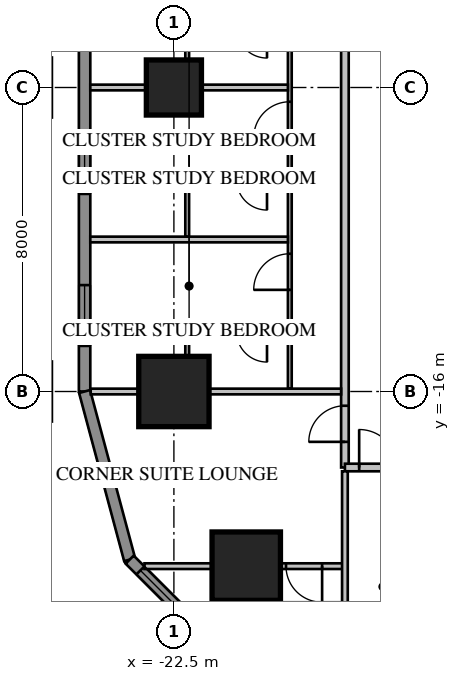
"""IFC4 building model, lengths in metres.
Left out: names, types, materials, properties, quantities, classifications, styles, units other than length and angle.
Written with IfcOpenShell. Run it as: python <this file> out.ifc"""

import sys

from ifc_helpers import new_model, si_unit, direction, frame, frame_2d, origin, origin_2d, place, context, subcontext, project, spatial, rectangle, extrude, element, fill, save


model = new_model("IFC4")
c1 = context("Model", 3, precision=1e-05, world=origin(), true_north=direction((0.0, 1.0)))
c2 = subcontext(c1, "Body", "Model", "MODEL_VIEW")
j1 = project(units=[si_unit("LENGTHUNIT", "METRE"), si_unit("PLANEANGLEUNIT", "RADIAN")], contexts=[c1])
p1 = place(None, origin())
s1 = spatial("IfcSite", under=j1, at=p1, CompositionType="ELEMENT")
p2 = place(p1, origin())
s2 = spatial("IfcBuilding", under=s1, at=p2, CompositionType="ELEMENT")
p3 = place(p2, frame((0.0, 0.0, 27.55)))
s3 = spatial("IfcBuildingStorey", under=s2, at=p3, CompositionType="ELEMENT", Elevation=27.55)
p4 = place(p3, frame((-22.5, -8.0, 0.0), z_axis=(0.0, 0.0, 1.0), x_axis=(1.0, 0.0, 0.0)))
e1 = element("IfcColumn", 1, at=p4, inside=s3, PredefinedType="COLUMN", context=c2, shape_type="SweptSolid", body=[
    extrude(rectangle(XDim=1.45, YDim=1.45, at=origin_2d()), origin(), (0.0, 0.0, 1.0), 3.85),
])
p5 = place(p3, frame((-22.5, -16.0, 0.0), z_axis=(0.0, 0.0, 1.0), x_axis=(1.0, 0.0, 0.0)))
e2 = element("IfcColumn", 2, at=p5, inside=s3, PredefinedType="COLUMN", context=c2, shape_type="SweptSolid", body=[
    extrude(rectangle(XDim=1.85, YDim=1.85, at=origin_2d()), origin(), (0.0, 0.0, 1.0), 3.85),
])
p6 = place(p3, frame((-20.596, -20.596, 0.0), z_axis=(0.0, 0.0, 1.0), x_axis=(1.0, 0.0, 0.0)))
e3 = element("IfcColumn", 3, at=p6, inside=s3, PredefinedType="COLUMN", context=c2, shape_type="SweptSolid", body=[
    extrude(rectangle(XDim=1.8, YDim=1.8, at=origin_2d()), origin(), (0.0, 0.0, 1.0), 3.85),
])
p7 = place(p3, frame((-24.85, 16.0, 0.0), z_axis=(0.0, 0.0, 1.0), x_axis=(0.0, -1.0, 0.0)))
e4 = element("IfcWall", 4, at=p7, inside=s3, PredefinedType="SOLIDWALL", context=c2, shape_type="SweptSolid", body=[
    extrude(rectangle(XDim=32.0, YDim=0.3, at=frame_2d((16.0, 0.0))), origin(), (0.0, 0.0, 1.0), 3.65),
])
p8 = place(p7, frame((1.2, 0.0, 0.75)))
e5 = element("IfcOpeningElement", 5, at=p8, cuts=e4, PredefinedType="OPENING", context=c2, shape_type="SweptSolid", body=[
    extrude(rectangle(XDim=1.6, YDim=1.8, at=frame_2d((0.8, 0.9))), frame((0.0, 0.17, 0.0), z_axis=(0.0, -1.0, 0.0), x_axis=(1.0, 0.0, 0.0)), (0.0, 0.0, 1.0), 0.34),
])
p9 = place(p7, frame((5.2, 0.0, 0.75)))
e6 = element("IfcOpeningElement", 6, at=p9, cuts=e4, PredefinedType="OPENING", context=c2, shape_type="SweptSolid", body=[
    extrude(rectangle(XDim=1.6, YDim=1.8, at=frame_2d((0.8, 0.9))), frame((0.0, 0.17, 0.0), z_axis=(0.0, -1.0, 0.0), x_axis=(1.0, 0.0, 0.0)), (0.0, 0.0, 1.0), 0.34),
])
p10 = place(p7, frame((17.2, 0.0, 0.75)))
e7 = element("IfcOpeningElement", 7, at=p10, cuts=e4, PredefinedType="OPENING", context=c2, shape_type="SweptSolid", body=[
    extrude(rectangle(XDim=1.6, YDim=1.8, at=frame_2d((0.8, 0.9))), frame((0.0, 0.17, 0.0), z_axis=(0.0, -1.0, 0.0), x_axis=(1.0, 0.0, 0.0)), (0.0, 0.0, 1.0), 0.34),
])
p11 = place(p7, frame((21.2, 0.0, 0.75)))
e8 = element("IfcOpeningElement", 8, at=p11, cuts=e4, PredefinedType="OPENING", context=c2, shape_type="SweptSolid", body=[
    extrude(rectangle(XDim=1.6, YDim=1.8, at=frame_2d((0.8, 0.9))), frame((0.0, 0.17, 0.0), z_axis=(0.0, -1.0, 0.0), x_axis=(1.0, 0.0, 0.0)), (0.0, 0.0, 1.0), 0.34),
])
p12 = place(p7, frame((25.2, 0.0, 0.75)))
e9 = element("IfcOpeningElement", 9, at=p12, cuts=e4, PredefinedType="OPENING", context=c2, shape_type="SweptSolid", body=[
    extrude(rectangle(XDim=1.6, YDim=1.8, at=frame_2d((0.8, 0.9))), frame((0.0, 0.17, 0.0), z_axis=(0.0, -1.0, 0.0), x_axis=(1.0, 0.0, 0.0)), (0.0, 0.0, 1.0), 0.34),
])
p13 = place(p7, frame((29.2, 0.0, 0.75)))
e10 = element("IfcOpeningElement", 10, at=p13, cuts=e4, PredefinedType="OPENING", context=c2, shape_type="SweptSolid", body=[
    extrude(rectangle(XDim=1.6, YDim=1.8, at=frame_2d((0.8, 0.9))), frame((0.0, 0.17, 0.0), z_axis=(0.0, -1.0, 0.0), x_axis=(1.0, 0.0, 0.0)), (0.0, 0.0, 1.0), 0.34),
])
p14 = place(p7, frame((8.8, 0.0, 0.75)))
e11 = element("IfcOpeningElement", 11, at=p14, cuts=e4, PredefinedType="OPENING", context=c2, shape_type="SweptSolid", body=[
    extrude(rectangle(XDim=2.4, YDim=1.8, at=frame_2d((1.2, 0.9))), frame((0.0, 0.17, 0.0), z_axis=(0.0, -1.0, 0.0), x_axis=(1.0, 0.0, 0.0)), (0.0, 0.0, 1.0), 0.34),
])
p15 = place(p7, frame((13.812, 0.0, 0.0)))
e12 = element("IfcOpeningElement", 12, at=p15, cuts=e4, PredefinedType="OPENING", context=c2, shape_type="SweptSolid", body=[
    extrude(rectangle(XDim=1.0, YDim=2.4, at=frame_2d((0.5, 1.2))), frame((0.0, 0.17, 0.0), z_axis=(0.0, -1.0, 0.0), x_axis=(1.0, 0.0, 0.0)), (0.0, 0.0, 1.0), 0.34),
])
p16 = place(p3, frame((-24.85, -16.0, 0.0), z_axis=(0.0, 0.0, 1.0), x_axis=(0.258839972501, -0.965920218567, 0.0)))
e13 = element("IfcWall", 13, at=p16, inside=s3, PredefinedType="SOLIDWALL", context=c2, shape_type="SweptSolid", body=[
    extrude(rectangle(XDim=4.581, YDim=0.3, at=frame_2d((2.291, 0.0))), origin(), (0.0, 0.0, 1.0), 3.65),
])
p17 = place(p3, frame((-23.664, -20.425, 0.0), z_axis=(0.0, 0.0, 1.0), x_axis=(0.707106781187, -0.707106781187, 0.0)))
e14 = element("IfcWall", 14, at=p17, inside=s3, PredefinedType="SOLIDWALL", context=c2, shape_type="SweptSolid", body=[
    extrude(rectangle(XDim=4.581, YDim=0.3, at=frame_2d((2.291, 0.0))), origin(), (0.0, 0.0, 1.0), 3.65),
])
p18 = place(p17, frame((0.4, 0.0, 0.75)))
e15 = element("IfcOpeningElement", 15, at=p18, cuts=e14, PredefinedType="OPENING", context=c2, shape_type="SweptSolid", body=[
    extrude(rectangle(XDim=3.781, YDim=1.8, at=frame_2d((1.891, 0.9))), frame((0.0, 0.17, 0.0), z_axis=(0.0, -1.0, 0.0), x_axis=(1.0, 0.0, 0.0)), (0.0, 0.0, 1.0), 0.34),
])
p19 = place(p3, frame((-18.0, 18.0, 0.0), z_axis=(0.0, 0.0, 1.0), x_axis=(0.0, -1.0, 0.0)))
e16 = element("IfcWall", 16, at=p19, inside=s3, PredefinedType="PARTITIONING", context=c2, shape_type="SweptSolid", body=[
    extrude(rectangle(XDim=36.0, YDim=0.2, at=frame_2d((18.0, 0.0))), origin(), (0.0, 0.0, 1.0), 3.65),
])
p20 = place(p19, frame((10.4, 0.0, 0.0)))
e17 = element("IfcOpeningElement", 17, at=p20, cuts=e16, PredefinedType="OPENING", context=c2, shape_type="SweptSolid", body=[
    extrude(rectangle(XDim=1.0, YDim=2.1, at=frame_2d((0.5, 1.05))), frame((0.0, 0.12, 0.0), z_axis=(0.0, -1.0, 0.0), x_axis=(1.0, 0.0, 0.0)), (0.0, 0.0, 1.0), 0.24),
])
p21 = place(p19, frame((14.4, 0.0, 0.0)))
e18 = element("IfcOpeningElement", 18, at=p21, cuts=e16, PredefinedType="OPENING", context=c2, shape_type="SweptSolid", body=[
    extrude(rectangle(XDim=1.0, YDim=2.1, at=frame_2d((0.5, 1.05))), frame((0.0, 0.12, 0.0), z_axis=(0.0, -1.0, 0.0), x_axis=(1.0, 0.0, 0.0)), (0.0, 0.0, 1.0), 0.24),
])
p22 = place(p19, frame((0.375, 0.0, 0.0)))
e19 = element("IfcOpeningElement", 19, at=p22, cuts=e16, PredefinedType="OPENING", context=c2, shape_type="SweptSolid", body=[
    extrude(rectangle(XDim=1.0, YDim=2.1, at=frame_2d((0.5, 1.05))), frame((0.0, 0.12, 0.0), z_axis=(0.0, -1.0, 0.0), x_axis=(1.0, 0.0, 0.0)), (0.0, 0.0, 1.0), 0.24),
])
p23 = place(p19, frame((34.375, 0.0, 0.0)))
e20 = element("IfcOpeningElement", 20, at=p23, cuts=e16, PredefinedType="OPENING", context=c2, shape_type="SweptSolid", body=[
    extrude(rectangle(XDim=0.95, YDim=2.1, at=frame_2d((0.475, 1.05))), frame((0.0, 0.12, 0.0), z_axis=(0.0, -1.0, 0.0), x_axis=(1.0, 0.0, 0.0)), (0.0, 0.0, 1.0), 0.24),
])
p24 = place(p3, frame((-19.45, 3.925, 0.0), z_axis=(0.0, 0.0, 1.0), x_axis=(0.0, -1.0, 0.0)))
e21 = element("IfcWall", 21, at=p24, inside=s3, PredefinedType="PARTITIONING", context=c2, shape_type="SweptSolid", body=[
    extrude(rectangle(XDim=19.85, YDim=0.1, at=frame_2d((9.925, 0.0))), origin(), (0.0, 0.0, 1.0), 3.65),
])
p25 = place(p24, frame((2.125, 0.0, 0.0)))
e22 = element("IfcOpeningElement", 22, at=p25, cuts=e21, PredefinedType="OPENING", context=c2, shape_type="SweptSolid", body=[
    extrude(rectangle(XDim=1.0, YDim=2.1, at=frame_2d((0.5, 1.05))), frame((0.0, 0.07, 0.0), z_axis=(0.0, -1.0, 0.0), x_axis=(1.0, 0.0, 0.0)), (0.0, 0.0, 1.0), 0.14),
])
p26 = place(p24, frame((0.3, 0.0, 0.0)))
e23 = element("IfcOpeningElement", 23, at=p26, cuts=e21, PredefinedType="OPENING", context=c2, shape_type="SweptSolid", body=[
    extrude(rectangle(XDim=0.8, YDim=2.1, at=frame_2d((0.4, 1.05))), frame((0.0, 0.07, 0.0), z_axis=(0.0, -1.0, 0.0), x_axis=(1.0, 0.0, 0.0)), (0.0, 0.0, 1.0), 0.14),
])
p27 = place(p24, frame((4.3, 0.0, 0.0)))
e24 = element("IfcOpeningElement", 24, at=p27, cuts=e21, PredefinedType="OPENING", context=c2, shape_type="SweptSolid", body=[
    extrude(rectangle(XDim=0.95, YDim=2.1, at=frame_2d((0.475, 1.05))), frame((0.0, 0.07, 0.0), z_axis=(0.0, -1.0, 0.0), x_axis=(1.0, 0.0, 0.0)), (0.0, 0.0, 1.0), 0.14),
])
p28 = place(p24, frame((8.3, 0.0, 0.0)))
e25 = element("IfcOpeningElement", 25, at=p28, cuts=e21, PredefinedType="OPENING", context=c2, shape_type="SweptSolid", body=[
    extrude(rectangle(XDim=0.95, YDim=2.1, at=frame_2d((0.475, 1.05))), frame((0.0, 0.07, 0.0), z_axis=(0.0, -1.0, 0.0), x_axis=(1.0, 0.0, 0.0)), (0.0, 0.0, 1.0), 0.14),
])
p29 = place(p24, frame((12.3, 0.0, 0.0)))
e26 = element("IfcOpeningElement", 26, at=p29, cuts=e21, PredefinedType="OPENING", context=c2, shape_type="SweptSolid", body=[
    extrude(rectangle(XDim=0.95, YDim=2.1, at=frame_2d((0.475, 1.05))), frame((0.0, 0.07, 0.0), z_axis=(0.0, -1.0, 0.0), x_axis=(1.0, 0.0, 0.0)), (0.0, 0.0, 1.0), 0.14),
])
p30 = place(p24, frame((16.3, 0.0, 0.0)))
e27 = element("IfcOpeningElement", 27, at=p30, cuts=e21, PredefinedType="OPENING", context=c2, shape_type="SweptSolid", body=[
    extrude(rectangle(XDim=0.95, YDim=2.1, at=frame_2d((0.475, 1.05))), frame((0.0, 0.07, 0.0), z_axis=(0.0, -1.0, 0.0), x_axis=(1.0, 0.0, 0.0)), (0.0, 0.0, 1.0), 0.14),
])
for number, where, z_axis, x_axis in (
    (28, (-19.5, -8.0, 0.0), (0.0, 0.0, 1.0), (-1.0, 0.0, 0.0)),
    (29, (-19.5, -12.0, 0.0), (0.0, 0.0, 1.0), (-1.0, 0.0, 0.0)),
):
    element("IfcWall", number, at=place(p3, frame(where, z_axis=z_axis, x_axis=x_axis)), inside=s3, PredefinedType="PARTITIONING", context=c2, shape_type="SweptSolid", body=[
        extrude(rectangle(XDim=5.2, YDim=0.15, at=frame_2d((2.6, 0.0))), origin(), (0.0, 0.0, 1.0), 3.65),
    ])
p31 = place(p3, frame((-18.1, -16.0, 0.0), z_axis=(0.0, 0.0, 1.0), x_axis=(-1.0, 0.0, 0.0)))
e30 = element("IfcWall", 30, at=p31, inside=s3, PredefinedType="PARTITIONING", context=c2, shape_type="SweptSolid", body=[
    extrude(rectangle(XDim=6.589, YDim=0.15, at=frame_2d((3.295, 0.0))), origin(), (0.0, 0.0, 1.0), 3.65),
])
p32 = place(p3, frame((-22.15, -6.475, 0.0), z_axis=(0.0, 0.0, 1.0), x_axis=(0.0, -1.0, 0.0)))
e31 = element("IfcWall", 31, at=p32, inside=s3, PredefinedType="PARTITIONING", context=c2, shape_type="SweptSolid", body=[
    extrude(rectangle(XDim=1.45, YDim=0.1, at=frame_2d((0.725, 0.0))), origin(), (0.0, 0.0, 1.0), 3.65),
])
p33 = place(p3, frame((-19.5, -10.425, 0.0), z_axis=(0.0, 0.0, 1.0), x_axis=(-1.0, 0.0, 0.0)))
e32 = element("IfcWall", 32, at=p33, inside=s3, PredefinedType="PARTITIONING", context=c2, shape_type="SweptSolid", body=[
    extrude(rectangle(XDim=2.7, YDim=0.1, at=frame_2d((1.35, 0.0))), origin(), (0.0, 0.0, 1.0), 3.65),
])
p34 = place(p33, frame((0.55, 0.0, 0.0)))
e33 = element("IfcOpeningElement", 33, at=p34, cuts=e32, PredefinedType="OPENING", context=c2, shape_type="SweptSolid", body=[
    extrude(rectangle(XDim=0.8, YDim=2.1, at=frame_2d((0.4, 1.05))), frame((0.0, 0.07, 0.0), z_axis=(0.0, -1.0, 0.0), x_axis=(1.0, 0.0, 0.0)), (0.0, 0.0, 1.0), 0.14),
])
p35 = place(p3, frame((-22.15, -10.475, 0.0), z_axis=(0.0, 0.0, 1.0), x_axis=(0.0, -1.0, 0.0)))
e34 = element("IfcWall", 34, at=p35, inside=s3, PredefinedType="PARTITIONING", context=c2, shape_type="SweptSolid", body=[
    extrude(rectangle(XDim=1.45, YDim=0.1, at=frame_2d((0.725, 0.0))), origin(), (0.0, 0.0, 1.0), 3.65),
])
p36 = place(p3, frame((-19.5, -14.425, 0.0), z_axis=(0.0, 0.0, 1.0), x_axis=(-1.0, 0.0, 0.0)))
e35 = element("IfcWall", 35, at=p36, inside=s3, PredefinedType="PARTITIONING", context=c2, shape_type="SweptSolid", body=[
    extrude(rectangle(XDim=2.7, YDim=0.1, at=frame_2d((1.35, 0.0))), origin(), (0.0, 0.0, 1.0), 3.65),
])
p37 = place(p36, frame((0.55, 0.0, 0.0)))
e36 = element("IfcOpeningElement", 36, at=p37, cuts=e35, PredefinedType="OPENING", context=c2, shape_type="SweptSolid", body=[
    extrude(rectangle(XDim=0.8, YDim=2.1, at=frame_2d((0.4, 1.05))), frame((0.0, 0.07, 0.0), z_axis=(0.0, -1.0, 0.0), x_axis=(1.0, 0.0, 0.0)), (0.0, 0.0, 1.0), 0.14),
])
p38 = place(p3, frame((-22.15, -14.475, 0.0), z_axis=(0.0, 0.0, 1.0), x_axis=(0.0, -1.0, 0.0)))
e37 = element("IfcWall", 37, at=p38, inside=s3, PredefinedType="PARTITIONING", context=c2, shape_type="SweptSolid", body=[
    extrude(rectangle(XDim=1.45, YDim=0.1, at=frame_2d((0.725, 0.0))), origin(), (0.0, 0.0, 1.0), 3.65),
])
p39 = place(p3, frame((-18.065, -20.596, 0.0), z_axis=(0.0, 0.0, 1.0), x_axis=(-1.0, 0.0, 0.0)))
e38 = element("IfcWall", 38, at=p39, inside=s3, PredefinedType="PARTITIONING", context=c2, shape_type="SweptSolid", body=[
    extrude(rectangle(XDim=5.209, YDim=0.15, at=frame_2d((2.604, 0.0))), origin(), (0.0, 0.0, 1.0), 3.65),
])
p40 = place(p39, frame((0.535, 0.0, 0.0)))
e39 = element("IfcOpeningElement", 39, at=p40, cuts=e38, PredefinedType="OPENING", context=c2, shape_type="SweptSolid", body=[
    extrude(rectangle(XDim=0.95, YDim=2.1, at=frame_2d((0.475, 1.05))), frame((0.0, 0.095, 0.0), z_axis=(0.0, -1.0, 0.0), x_axis=(1.0, 0.0, 0.0)), (0.0, 0.0, 1.0), 0.19),
])
p41 = place(p3, frame((-18.0, -18.0, 0.0), z_axis=(0.0, 0.0, 1.0), x_axis=(1.0, 0.0, 0.0)))
e40 = element("IfcWall", 40, at=p41, inside=s3, PredefinedType="PARTITIONING", context=c2, shape_type="SweptSolid", body=[
    extrude(rectangle(XDim=36.0, YDim=0.2, at=frame_2d((18.0, 0.0))), origin(), (0.0, 0.0, 1.0), 3.65),
])
p42 = place(p41, frame((0.375, 0.0, 0.0)))
e41 = element("IfcOpeningElement", 41, at=p42, cuts=e40, PredefinedType="OPENING", context=c2, shape_type="SweptSolid", body=[
    extrude(rectangle(XDim=1.0, YDim=2.1, at=frame_2d((0.5, 1.05))), frame((0.0, 0.12, 0.0), z_axis=(0.0, -1.0, 0.0), x_axis=(1.0, 0.0, 0.0)), (0.0, 0.0, 1.0), 0.24),
])
p43 = place(p41, frame((2.45, 0.0, 0.0)))
e42 = element("IfcOpeningElement", 42, at=p43, cuts=e40, PredefinedType="OPENING", context=c2, shape_type="SweptSolid", body=[
    extrude(rectangle(XDim=0.8, YDim=2.1, at=frame_2d((0.4, 1.05))), frame((0.0, 0.12, 0.0), z_axis=(0.0, -1.0, 0.0), x_axis=(1.0, 0.0, 0.0)), (0.0, 0.0, 1.0), 0.24),
])
p44 = place(p41, frame((4.05, 0.0, 0.0)))
e43 = element("IfcOpeningElement", 43, at=p44, cuts=e40, PredefinedType="OPENING", context=c2, shape_type="SweptSolid", body=[
    extrude(rectangle(XDim=1.0, YDim=2.1, at=frame_2d((0.5, 1.05))), frame((0.0, 0.12, 0.0), z_axis=(0.0, -1.0, 0.0), x_axis=(1.0, 0.0, 0.0)), (0.0, 0.0, 1.0), 0.24),
])
p45 = place(p41, frame((6.45, 0.0, 0.0)))
e44 = element("IfcOpeningElement", 44, at=p45, cuts=e40, PredefinedType="OPENING", context=c2, shape_type="SweptSolid", body=[
    extrude(rectangle(XDim=0.9, YDim=2.1, at=frame_2d((0.45, 1.05))), frame((0.0, 0.12, 0.0), z_axis=(0.0, -1.0, 0.0), x_axis=(1.0, 0.0, 0.0)), (0.0, 0.0, 1.0), 0.24),
])
p46 = place(p41, frame((8.15, 0.0, 0.0)))
e45 = element("IfcOpeningElement", 45, at=p46, cuts=e40, PredefinedType="OPENING", context=c2, shape_type="SweptSolid", body=[
    extrude(rectangle(XDim=1.0, YDim=2.1, at=frame_2d((0.5, 1.05))), frame((0.0, 0.12, 0.0), z_axis=(0.0, -1.0, 0.0), x_axis=(1.0, 0.0, 0.0)), (0.0, 0.0, 1.0), 0.24),
])
p47 = place(p41, frame((19.8, 0.0, 0.0)))
e46 = element("IfcOpeningElement", 46, at=p47, cuts=e40, PredefinedType="OPENING", context=c2, shape_type="SweptSolid", body=[
    extrude(rectangle(XDim=0.95, YDim=2.1, at=frame_2d((0.475, 1.05))), frame((0.0, 0.12, 0.0), z_axis=(0.0, -1.0, 0.0), x_axis=(1.0, 0.0, 0.0)), (0.0, 0.0, 1.0), 0.24),
])
p48 = place(p41, frame((23.8, 0.0, 0.0)))
e47 = element("IfcOpeningElement", 47, at=p48, cuts=e40, PredefinedType="OPENING", context=c2, shape_type="SweptSolid", body=[
    extrude(rectangle(XDim=0.95, YDim=2.1, at=frame_2d((0.475, 1.05))), frame((0.0, 0.12, 0.0), z_axis=(0.0, -1.0, 0.0), x_axis=(1.0, 0.0, 0.0)), (0.0, 0.0, 1.0), 0.24),
])
p49 = place(p41, frame((27.8, 0.0, 0.0)))
e48 = element("IfcOpeningElement", 48, at=p49, cuts=e40, PredefinedType="OPENING", context=c2, shape_type="SweptSolid", body=[
    extrude(rectangle(XDim=0.95, YDim=2.1, at=frame_2d((0.475, 1.05))), frame((0.0, 0.12, 0.0), z_axis=(0.0, -1.0, 0.0), x_axis=(1.0, 0.0, 0.0)), (0.0, 0.0, 1.0), 0.24),
])
p50 = place(p41, frame((31.8, 0.0, 0.0)))
e49 = element("IfcOpeningElement", 49, at=p50, cuts=e40, PredefinedType="OPENING", context=c2, shape_type="SweptSolid", body=[
    extrude(rectangle(XDim=0.95, YDim=2.1, at=frame_2d((0.475, 1.05))), frame((0.0, 0.12, 0.0), z_axis=(0.0, -1.0, 0.0), x_axis=(1.0, 0.0, 0.0)), (0.0, 0.0, 1.0), 0.24),
])
p51 = place(p41, frame((34.375, 0.0, 0.0)))
e50 = element("IfcOpeningElement", 50, at=p51, cuts=e40, PredefinedType="OPENING", context=c2, shape_type="SweptSolid", body=[
    extrude(rectangle(XDim=0.95, YDim=2.1, at=frame_2d((0.475, 1.05))), frame((0.0, 0.12, 0.0), z_axis=(0.0, -1.0, 0.0), x_axis=(1.0, 0.0, 0.0)), (0.0, 0.0, 1.0), 0.24),
])
p52 = place(p41, frame((11.2, 0.0, 0.0)))
e51 = element("IfcOpeningElement", 51, at=p52, cuts=e40, PredefinedType="OPENING", context=c2, shape_type="SweptSolid", body=[
    extrude(rectangle(XDim=1.0, YDim=2.1, at=frame_2d((0.5, 1.05))), frame((0.0, 0.12, 0.0), z_axis=(0.0, -1.0, 0.0), x_axis=(1.0, 0.0, 0.0)), (0.0, 0.0, 1.0), 0.24),
])
p53 = place(p3, frame((-18.0, -18.1, 0.0), z_axis=(0.0, 0.0, 1.0), x_axis=(0.0, -1.0, 0.0)))
e52 = element("IfcWall", 52, at=p53, inside=s3, PredefinedType="PARTITIONING", context=c2, shape_type="SweptSolid", body=[
    extrude(rectangle(XDim=6.053, YDim=0.15, at=frame_2d((3.027, 0.0))), origin(), (0.0, 0.0, 1.0), 3.65),
])
p54 = place(p12, origin())
e53 = element("IfcWindow", 53, at=p54, inside=s3, PartitioningType="SINGLE_PANEL", PredefinedType="WINDOW", context=c2, shape_type="SweptSolid", body=[
    extrude(rectangle(XDim=1.6, YDim=1.8, at=frame_2d((0.8, 0.9))), frame((0.0, 0.03, 0.0), z_axis=(0.0, -1.0, 0.0), x_axis=(1.0, 0.0, 0.0)), (0.0, 0.0, 1.0), 0.06),
])
fill(e9, e53)
p55 = place(p13, origin())
e54 = element("IfcWindow", 54, at=p55, inside=s3, PartitioningType="SINGLE_PANEL", PredefinedType="WINDOW", context=c2, shape_type="SweptSolid", body=[
    extrude(rectangle(XDim=1.6, YDim=1.8, at=frame_2d((0.8, 0.9))), frame((0.0, 0.03, 0.0), z_axis=(0.0, -1.0, 0.0), x_axis=(1.0, 0.0, 0.0)), (0.0, 0.0, 1.0), 0.06),
])
fill(e10, e54)
p56 = place(p18, origin())
e55 = element("IfcWindow", 55, at=p56, inside=s3, PartitioningType="SINGLE_PANEL", PredefinedType="WINDOW", context=c2, shape_type="SweptSolid", body=[
    extrude(rectangle(XDim=3.781, YDim=1.8, at=frame_2d((1.891, 0.9))), frame((0.0, 0.03, 0.0), z_axis=(0.0, -1.0, 0.0), x_axis=(1.0, 0.0, 0.0)), (0.0, 0.0, 1.0), 0.06),
])
fill(e15, e55)
p57 = place(p29, origin())
e56 = element("IfcDoor", 56, at=p57, inside=s3, OperationType="SINGLE_SWING_RIGHT", PredefinedType="DOOR", context=c2, shape_type="SweptSolid", body=[
    extrude(rectangle(XDim=0.95, YDim=2.1, at=frame_2d((0.475, 1.05))), frame((0.0, 0.025, 0.0), z_axis=(0.0, -1.0, 0.0), x_axis=(1.0, 0.0, 0.0)), (0.0, 0.0, 1.0), 0.05),
])
fill(e26, e56)
p58 = place(p34, origin())
e57 = element("IfcDoor", 57, at=p58, inside=s3, OperationType="SINGLE_SWING_LEFT", PredefinedType="DOOR", context=c2, shape_type="SweptSolid", body=[
    extrude(rectangle(XDim=0.8, YDim=2.1, at=frame_2d((0.4, 1.05))), frame((0.0, 0.025, 0.0), z_axis=(0.0, -1.0, 0.0), x_axis=(1.0, 0.0, 0.0)), (0.0, 0.0, 1.0), 0.05),
])
fill(e33, e57)
p59 = place(p30, origin())
e58 = element("IfcDoor", 58, at=p59, inside=s3, OperationType="SINGLE_SWING_RIGHT", PredefinedType="DOOR", context=c2, shape_type="SweptSolid", body=[
    extrude(rectangle(XDim=0.95, YDim=2.1, at=frame_2d((0.475, 1.05))), frame((0.0, 0.025, 0.0), z_axis=(0.0, -1.0, 0.0), x_axis=(1.0, 0.0, 0.0)), (0.0, 0.0, 1.0), 0.05),
])
fill(e27, e58)
p60 = place(p37, origin())
e59 = element("IfcDoor", 59, at=p60, inside=s3, OperationType="SINGLE_SWING_LEFT", PredefinedType="DOOR", context=c2, shape_type="SweptSolid", body=[
    extrude(rectangle(XDim=0.8, YDim=2.1, at=frame_2d((0.4, 1.05))), frame((0.0, 0.025, 0.0), z_axis=(0.0, -1.0, 0.0), x_axis=(1.0, 0.0, 0.0)), (0.0, 0.0, 1.0), 0.05),
])
fill(e36, e59)
p61 = place(p23, origin())
e60 = element("IfcDoor", 60, at=p61, inside=s3, OperationType="SINGLE_SWING_RIGHT", PredefinedType="DOOR", context=c2, shape_type="SweptSolid", body=[
    extrude(rectangle(XDim=0.95, YDim=2.1, at=frame_2d((0.475, 1.05))), frame((0.0, 0.025, 0.0), z_axis=(0.0, -1.0, 0.0), x_axis=(1.0, 0.0, 0.0)), (0.0, 0.0, 1.0), 0.05),
])
fill(e20, e60)
p62 = place(p40, origin())
e61 = element("IfcDoor", 61, at=p62, inside=s3, OperationType="SINGLE_SWING_LEFT", PredefinedType="DOOR", context=c2, shape_type="SweptSolid", body=[
    extrude(rectangle(XDim=0.95, YDim=2.1, at=frame_2d((0.475, 1.05))), frame((0.0, 0.025, 0.0), z_axis=(0.0, -1.0, 0.0), x_axis=(1.0, 0.0, 0.0)), (0.0, 0.0, 1.0), 0.05),
])
fill(e39, e61)
p63 = place(p42, origin())
e62 = element("IfcDoor", 62, at=p63, inside=s3, OperationType="SINGLE_SWING_LEFT", PredefinedType="DOOR", context=c2, shape_type="SweptSolid", body=[
    extrude(rectangle(XDim=1.0, YDim=2.1, at=frame_2d((0.5, 1.05))), frame((0.0, 0.025, 0.0), z_axis=(0.0, -1.0, 0.0), x_axis=(1.0, 0.0, 0.0)), (0.0, 0.0, 1.0), 0.05),
])
fill(e41, e62)
save(model, sys.argv[1])
